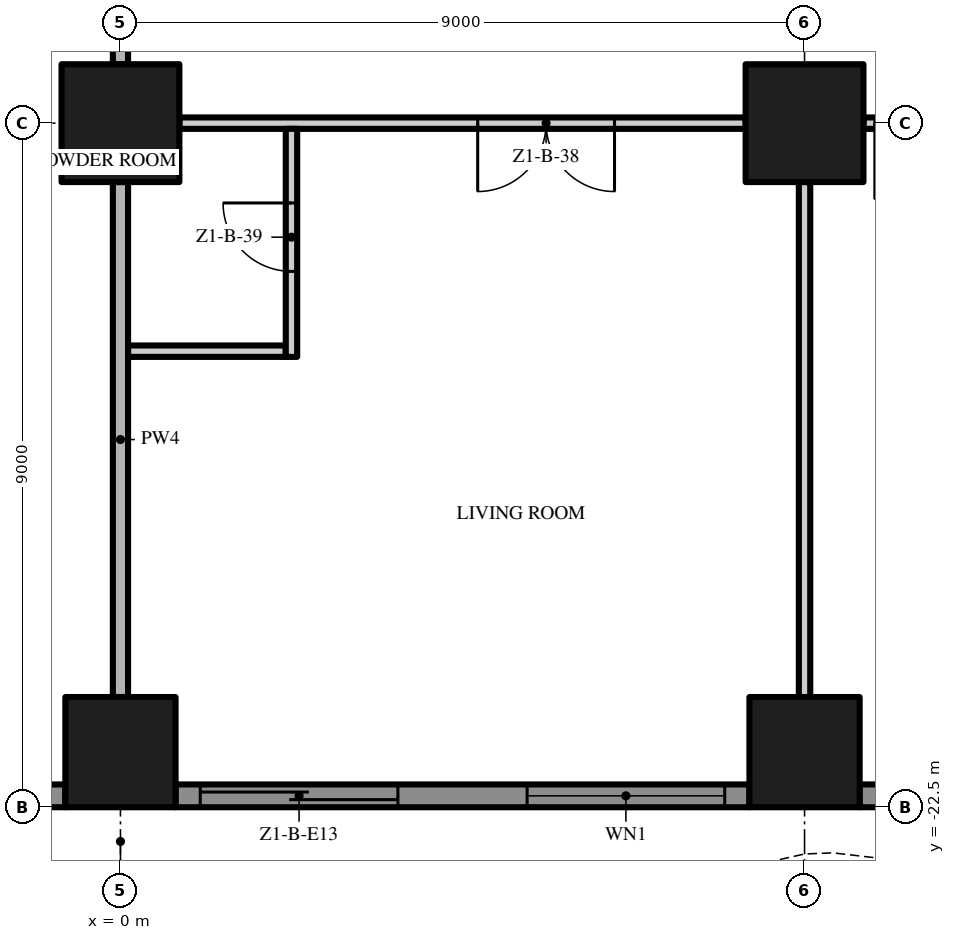
"""IFC4 building model, lengths in metres.
Left out: names, types, materials, properties, quantities, classifications, styles, units other than length and angle.
Written with IfcOpenShell. Run it as: python <this file> out.ifc"""

import sys

from ifc_helpers import new_model, si_unit, direction, frame, frame_2d, origin, origin_2d, place, context, subcontext, project, spatial, polyline, rectangle, outline, extrude, element, fill, save


model = new_model("IFC4")
c1 = context("Model", 3, precision=1e-05, world=origin(), true_north=direction((0.0, 1.0)))
c2 = subcontext(c1, "Body", "Model", "MODEL_VIEW")
j1 = project(units=[si_unit("LENGTHUNIT", "METRE"), si_unit("PLANEANGLEUNIT", "RADIAN")], contexts=[c1])
p1 = place(None, origin())
s1 = spatial("IfcSite", under=j1, at=p1, CompositionType="ELEMENT")
p2 = place(p1, origin())
s2 = spatial("IfcBuilding", under=s1, at=p2, CompositionType="ELEMENT")
p3 = place(p2, frame((0.0, 0.0, 34.0)))
s3 = spatial("IfcBuildingStorey", under=s2, at=p3, CompositionType="ELEMENT", Elevation=34.0)
p4 = place(p3, frame((0.0, -13.5, 0.0), z_axis=(0.0, 0.0, 1.0), x_axis=(1.0, 0.0, 0.0)))
e1 = element("IfcColumn", 1, at=p4, inside=s3, PredefinedType="COLUMN", context=c2, shape_type="SweptSolid", body=[
    extrude(rectangle(XDim=1.55, YDim=1.55, at=origin_2d()), origin(), (0.0, 0.0, 1.0), 3.5),
])
p5 = place(p3, frame((0.0, -21.775, 0.0), z_axis=(0.0, 0.0, 1.0), x_axis=(1.0, 0.0, 0.0)))
e2 = element("IfcColumn", 2, at=p5, inside=s3, PredefinedType="COLUMN", context=c2, shape_type="SweptSolid", body=[
    extrude(rectangle(XDim=1.45, YDim=1.45, at=origin_2d()), origin(), (0.0, 0.0, 1.0), 3.5),
])
p6 = place(p3, frame((9.0, -13.5, 0.0), z_axis=(0.0, 0.0, 1.0), x_axis=(1.0, 0.0, 0.0)))
e3 = element("IfcColumn", 3, at=p6, inside=s3, PredefinedType="COLUMN", context=c2, shape_type="SweptSolid", body=[
    extrude(rectangle(XDim=1.55, YDim=1.55, at=origin_2d()), origin(), (0.0, 0.0, 1.0), 3.5),
])
p7 = place(p3, frame((9.0, -21.775, 0.0), z_axis=(0.0, 0.0, 1.0), x_axis=(1.0, 0.0, 0.0)))
e4 = element("IfcColumn", 4, at=p7, inside=s3, PredefinedType="COLUMN", context=c2, shape_type="SweptSolid", body=[
    extrude(rectangle(XDim=1.45, YDim=1.45, at=origin_2d()), origin(), (0.0, 0.0, 1.0), 3.5),
])
p8 = place(p3, frame((-0.725, -22.35, 0.0), z_axis=(0.0, 0.0, 1.0), x_axis=(-1.0, 0.0, 0.0)))
e5 = element("IfcWall", 5, at=p8, inside=s3, PredefinedType="SOLIDWALL", context=c2, shape_type="SweptSolid", body=[
    extrude(rectangle(XDim=7.55, YDim=0.3, at=frame_2d((3.775, 0.0))), origin(), (0.0, 0.0, 1.0), 3.5),
])
p9 = place(p8, frame((4.625, 0.0, 0.45)))
e6 = element("IfcOpeningElement", 6, at=p9, cuts=e5, PredefinedType="OPENING", context=c2, shape_type="SweptSolid", body=[
    extrude(rectangle(XDim=2.6, YDim=2.65, at=frame_2d((1.3, 1.325))), frame((0.0, 0.16, 0.0), z_axis=(0.0, -1.0, 0.0), x_axis=(1.0, 0.0, 0.0)), (0.0, 0.0, 1.0), 0.32),
])
p10 = place(p8, frame((0.325, 0.0, 0.45)))
e7 = element("IfcOpeningElement", 7, at=p10, cuts=e5, PredefinedType="OPENING", context=c2, shape_type="SweptSolid", body=[
    extrude(rectangle(XDim=2.6, YDim=2.65, at=frame_2d((1.3, 1.325))), frame((0.0, 0.16, 0.0), z_axis=(0.0, -1.0, 0.0), x_axis=(1.0, 0.0, 0.0)), (0.0, 0.0, 1.0), 0.32),
])
p11 = place(p3, frame((8.275, -22.35, 0.0), z_axis=(0.0, 0.0, 1.0), x_axis=(-1.0, 0.0, 0.0)))
e8 = element("IfcWall", 8, at=p11, inside=s3, PredefinedType="SOLIDWALL", context=c2, shape_type="SweptSolid", body=[
    extrude(rectangle(XDim=7.55, YDim=0.3, at=frame_2d((3.775, 0.0))), origin(), (0.0, 0.0, 1.0), 3.5),
])
p12 = place(p11, frame((4.625, 0.0, 0.0)))
e9 = element("IfcOpeningElement", 9, at=p12, cuts=e8, PredefinedType="OPENING", context=c2, shape_type="SweptSolid", body=[
    extrude(rectangle(XDim=2.6, YDim=2.4, at=frame_2d((1.3, 1.2))), frame((0.0, 0.16, 0.0), z_axis=(0.0, -1.0, 0.0), x_axis=(1.0, 0.0, 0.0)), (0.0, 0.0, 1.0), 0.32),
])
p13 = place(p11, frame((0.325, 0.0, 0.45)))
e10 = element("IfcOpeningElement", 10, at=p13, cuts=e8, PredefinedType="OPENING", context=c2, shape_type="SweptSolid", body=[
    extrude(rectangle(XDim=2.6, YDim=2.65, at=frame_2d((1.3, 1.325))), frame((0.0, 0.16, 0.0), z_axis=(0.0, -1.0, 0.0), x_axis=(1.0, 0.0, 0.0)), (0.0, 0.0, 1.0), 0.32),
])
p14 = place(p3, frame((17.275, -22.35, 0.0), z_axis=(0.0, 0.0, 1.0), x_axis=(-1.0, 0.0, 0.0)))
e11 = element("IfcWall", 11, at=p14, inside=s3, PredefinedType="SOLIDWALL", context=c2, shape_type="SweptSolid", body=[
    extrude(rectangle(XDim=7.55, YDim=0.3, at=frame_2d((3.775, 0.0))), origin(), (0.0, 0.0, 1.0), 3.5),
])
p15 = place(p14, frame((4.625, 0.0, 0.45)))
e12 = element("IfcOpeningElement", 12, at=p15, cuts=e11, PredefinedType="OPENING", context=c2, shape_type="SweptSolid", body=[
    extrude(rectangle(XDim=2.6, YDim=2.65, at=frame_2d((1.3, 1.325))), frame((0.0, 0.16, 0.0), z_axis=(0.0, -1.0, 0.0), x_axis=(1.0, 0.0, 0.0)), (0.0, 0.0, 1.0), 0.32),
])
p16 = place(p14, frame((0.325, 0.0, 0.0)))
e13 = element("IfcOpeningElement", 13, at=p16, cuts=e11, PredefinedType="OPENING", context=c2, shape_type="SweptSolid", body=[
    extrude(rectangle(XDim=2.6, YDim=2.4, at=frame_2d((1.3, 1.2))), frame((0.0, 0.16, 0.0), z_axis=(0.0, -1.0, 0.0), x_axis=(1.0, 0.0, 0.0)), (0.0, 0.0, 1.0), 0.32),
])
p17 = place(p3, origin())
e14 = element("IfcWall", 14, at=p17, inside=s3, PredefinedType="USERDEFINED", context=c2, shape_type="SweptSolid", body=[
    extrude(outline(polyline([(-22.5, -23.451), (-21.0, -23.115), (-20.625, -23.1), (-19.5, -23.231), (-18.0, -23.755), (-16.5, -24.488), (-15.0, -25.149), (-13.5, -25.485), (-13.125, -25.5), (-12.0, -25.369), (-10.5, -24.845), (-9.0, -24.112), (-7.5, -23.451), (-6.0, -23.115), (-5.625, -23.1), (-4.5, -23.231), (-3.0, -23.755), (-1.5, -24.488), (0.0, -25.149), (1.5, -25.485), (1.875, -25.5), (3.0, -25.369), (4.5, -24.845), (6.0, -24.112), (7.5, -23.451), (9.0, -23.115), (9.375, -23.1), (10.5, -23.231), (12.0, -23.755), (13.5, -24.488), (15.0, -25.149), (16.5, -25.485), (16.875, -25.5), (18.0, -25.369), (19.5, -24.845), (21.0, -24.112), (22.5, -23.451), (22.399, -23.223), (20.895, -23.885), (19.404, -24.614), (17.944, -25.124), (16.865, -25.249), (16.533, -25.236), (15.079, -24.91), (13.605, -24.261), (12.096, -23.524), (10.556, -22.986), (9.385, -22.849), (8.967, -22.866), (7.421, -23.213), (5.895, -23.885), (4.404, -24.614), (2.944, -25.124), (1.865, -25.249), (1.533, -25.236), (0.079, -24.91), (-1.395, -24.261), (-2.904, -23.524), (-4.444, -22.986), (-5.615, -22.849), (-6.033, -22.866), (-7.579, -23.213), (-9.105, -23.885), (-10.596, -24.614), (-12.056, -25.124), (-13.135, -25.249), (-13.467, -25.236), (-14.921, -24.91), (-16.395, -24.261), (-17.904, -23.524), (-19.444, -22.986), (-20.615, -22.849), (-21.033, -22.866), (-22.555, -23.208), (-22.5, -23.451)])), origin(), (0.0, 0.0, 1.0), 0.9),
])
p18 = place(p3, frame((0.1, -16.5, 0.0), z_axis=(0.0, 0.0, 1.0), x_axis=(1.0, 0.0, 0.0)))
e15 = element("IfcWall", 15, at=p18, inside=s3, PredefinedType="PARTITIONING", context=c2, shape_type="SweptSolid", body=[
    extrude(rectangle(XDim=2.075, YDim=0.15, at=frame_2d((1.038, 0.0))), origin(), (0.0, 0.0, 1.0), 3.5),
])
p19 = place(p3, frame((8.225, -13.5, 0.0), z_axis=(0.0, 0.0, 1.0), x_axis=(-1.0, 0.0, 0.0)))
e16 = element("IfcWall", 16, at=p19, inside=s3, PredefinedType="PARTITIONING", context=c2, shape_type="SweptSolid", body=[
    extrude(rectangle(XDim=7.45, YDim=0.15, at=frame_2d((3.725, 0.0))), origin(), (0.0, 0.0, 1.0), 3.5),
])
p20 = place(p19, frame((1.725, 0.0, 0.0)))
e17 = element("IfcOpeningElement", 17, at=p20, cuts=e16, PredefinedType="OPENING", context=c2, shape_type="SweptSolid", body=[
    extrude(rectangle(XDim=1.8, YDim=2.4, at=frame_2d((0.9, 1.2))), frame((0.0, 0.085, 0.0), z_axis=(0.0, -1.0, 0.0), x_axis=(1.0, 0.0, 0.0)), (0.0, 0.0, 1.0), 0.17),
])
p21 = place(p3, frame((17.225, -13.5, 0.0), z_axis=(0.0, 0.0, 1.0), x_axis=(-1.0, 0.0, 0.0)))
e18 = element("IfcWall", 18, at=p21, inside=s3, PredefinedType="PARTITIONING", context=c2, shape_type="SweptSolid", body=[
    extrude(rectangle(XDim=7.45, YDim=0.15, at=frame_2d((3.725, 0.0))), origin(), (0.0, 0.0, 1.0), 3.5),
])
p22 = place(p21, frame((6.3, 0.0, 0.0)))
e19 = element("IfcOpeningElement", 19, at=p22, cuts=e18, PredefinedType="OPENING", context=c2, shape_type="SweptSolid", body=[
    extrude(rectangle(XDim=1.0, YDim=2.4, at=frame_2d((0.5, 1.2))), frame((0.0, 0.085, 0.0), z_axis=(0.0, -1.0, 0.0), x_axis=(1.0, 0.0, 0.0)), (0.0, 0.0, 1.0), 0.17),
])
p23 = place(p21, frame((0.15, 0.0, 0.0)))
e20 = element("IfcOpeningElement", 20, at=p23, cuts=e18, PredefinedType="OPENING", context=c2, shape_type="SweptSolid", body=[
    extrude(rectangle(XDim=1.0, YDim=2.4, at=frame_2d((0.5, 1.2))), frame((0.0, 0.085, 0.0), z_axis=(0.0, -1.0, 0.0), x_axis=(1.0, 0.0, 0.0)), (0.0, 0.0, 1.0), 0.17),
])
p24 = place(p3, frame((0.0, -21.05, 0.0), z_axis=(0.0, 0.0, 1.0), x_axis=(0.0, 1.0, 0.0)))
e21 = element("IfcWall", 21, at=p24, inside=s3, PredefinedType="PARTITIONING", context=c2, shape_type="SweptSolid", body=[
    extrude(rectangle(XDim=6.775, YDim=0.2, at=frame_2d((3.388, 0.0))), origin(), (0.0, 0.0, 1.0), 3.5),
])
p25 = place(p3, frame((0.0, -12.725, 0.0), z_axis=(0.0, 0.0, 1.0), x_axis=(0.0, 1.0, 0.0)))
e22 = element("IfcWall", 22, at=p25, inside=s3, PredefinedType="PARTITIONING", context=c2, shape_type="SweptSolid", body=[
    extrude(rectangle(XDim=7.45, YDim=0.2, at=frame_2d((3.725, 0.0))), origin(), (0.0, 0.0, 1.0), 3.5),
])
p26 = place(p3, frame((2.25, -16.575, 0.0), z_axis=(0.0, 0.0, 1.0), x_axis=(0.0, 1.0, 0.0)))
e23 = element("IfcWall", 23, at=p26, inside=s3, PredefinedType="PARTITIONING", context=c2, shape_type="SweptSolid", body=[
    extrude(rectangle(XDim=3.0, YDim=0.15, at=frame_2d((1.5, 0.0))), origin(), (0.0, 0.0, 1.0), 3.5),
])
p27 = place(p26, frame((1.125, 0.0, 0.0)))
e24 = element("IfcOpeningElement", 24, at=p27, cuts=e23, PredefinedType="OPENING", context=c2, shape_type="SweptSolid", body=[
    extrude(rectangle(XDim=0.9, YDim=2.1, at=frame_2d((0.45, 1.05))), frame((0.0, 0.085, 0.0), z_axis=(0.0, -1.0, 0.0), x_axis=(1.0, 0.0, 0.0)), (0.0, 0.0, 1.0), 0.17),
])
p28 = place(p3, frame((9.0, -21.05, 0.0), z_axis=(0.0, 0.0, 1.0), x_axis=(0.0, 1.0, 0.0)))
e25 = element("IfcWall", 25, at=p28, inside=s3, PredefinedType="PARTITIONING", context=c2, shape_type="SweptSolid", body=[
    extrude(rectangle(XDim=6.775, YDim=0.15, at=frame_2d((3.388, 0.0))), origin(), (0.0, 0.0, 1.0), 3.5),
])
p29 = place(p12, origin())
e26 = element("IfcDoor", 26, at=p29, inside=s3, OperationType="SINGLE_SWING_LEFT", PredefinedType="DOOR", context=c2, shape_type="SweptSolid", body=[
    extrude(rectangle(XDim=2.6, YDim=2.4, at=frame_2d((1.3, 1.2))), frame((0.0, 0.025, 0.0), z_axis=(0.0, -1.0, 0.0), x_axis=(1.0, 0.0, 0.0)), (0.0, 0.0, 1.0), 0.05),
])
fill(e9, e26)
p30 = place(p13, origin())
e27 = element("IfcWindow", 27, at=p30, inside=s3, PartitioningType="SINGLE_PANEL", PredefinedType="WINDOW", context=c2, shape_type="SweptSolid", body=[
    extrude(rectangle(XDim=2.6, YDim=2.65, at=frame_2d((1.3, 1.325))), frame((0.0, 0.03, 0.0), z_axis=(0.0, -1.0, 0.0), x_axis=(1.0, 0.0, 0.0)), (0.0, 0.0, 1.0), 0.06),
])
fill(e10, e27)
p31 = place(p20, origin())
e28 = element("IfcDoor", 28, at=p31, inside=s3, OperationType="DOUBLE_DOOR_SINGLE_SWING", PredefinedType="DOOR", context=c2, shape_type="SweptSolid", body=[
    extrude(rectangle(XDim=1.8, YDim=2.4, at=frame_2d((0.9, 1.2))), frame((0.0, 0.025, 0.0), z_axis=(0.0, -1.0, 0.0), x_axis=(1.0, 0.0, 0.0)), (0.0, 0.0, 1.0), 0.05),
])
fill(e17, e28)
p32 = place(p27, origin())
e29 = element("IfcDoor", 29, at=p32, inside=s3, OperationType="SINGLE_SWING_RIGHT", PredefinedType="DOOR", context=c2, shape_type="SweptSolid", body=[
    extrude(rectangle(XDim=0.9, YDim=2.1, at=frame_2d((0.45, 1.05))), frame((0.0, 0.025, 0.0), z_axis=(0.0, -1.0, 0.0), x_axis=(1.0, 0.0, 0.0)), (0.0, 0.0, 1.0), 0.05),
])
fill(e24, e29)
save(model, sys.argv[1])
